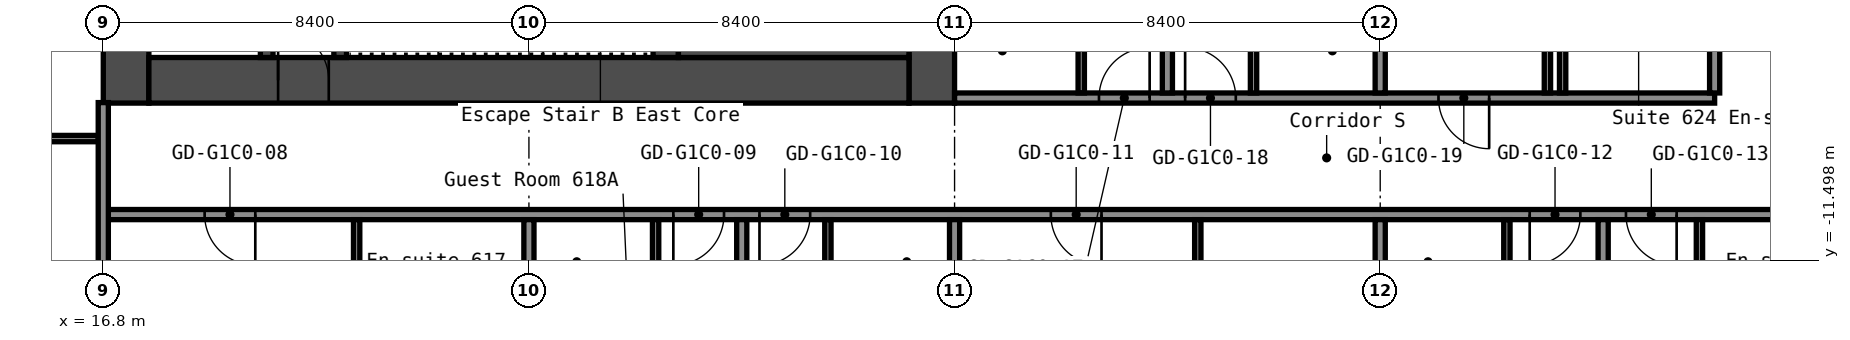
"""IFC4 building model, lengths in metres.
Left out: names, types, materials, properties, quantities, classifications, styles, units other than length and angle.
Written with IfcOpenShell. Run it as: python <this file> out.ifc"""

import sys

from ifc_helpers import new_model, si_unit, direction, frame, frame_2d, origin, place, context, subcontext, project, spatial, rectangle, extrude, element, fill, save


model = new_model("IFC4")
c1 = context("Model", 3, precision=1e-05, world=origin(), true_north=direction((0.0, 1.0)))
c2 = subcontext(c1, "Body", "Model", "MODEL_VIEW")
j1 = project(units=[si_unit("LENGTHUNIT", "METRE"), si_unit("PLANEANGLEUNIT", "RADIAN")], contexts=[c1])
p1 = place(None, origin())
s1 = spatial("IfcSite", under=j1, at=p1, CompositionType="ELEMENT")
p2 = place(p1, origin())
s2 = spatial("IfcBuilding", under=s1, at=p2, CompositionType="ELEMENT")
p3 = place(p2, frame((0.0, 0.0, 26.2)))
s3 = spatial("IfcBuildingStorey", under=s2, at=p3, CompositionType="ELEMENT", Elevation=26.2)
p4 = place(p3, frame((17.25, -8.4, 0.0), z_axis=(0.0, 0.0, 1.0), x_axis=(0.0, 1.0, 0.0)))
e1 = element("IfcWall", 1, at=p4, inside=s3, PredefinedType="SHEAR", context=c2, shape_type="SweptSolid", body=[
    extrude(rectangle(XDim=16.8, YDim=0.9, at=frame_2d((8.4, 0.0))), origin(), (0.0, 0.0, 1.0), 2.8),
])
p5 = place(p4, frame((12.75, 0.0, 0.0)))
e2 = element("IfcOpeningElement", 2, at=p5, cuts=e1, PredefinedType="OPENING", context=c2, shape_type="SweptSolid", body=[
    extrude(rectangle(XDim=1.2, YDim=2.1, at=frame_2d((0.6, 1.05))), frame((0.0, 0.46, 0.0), z_axis=(0.0, -1.0, 0.0), x_axis=(1.0, 0.0, 0.0)), (0.0, 0.0, 1.0), 0.92),
])
p6 = place(p4, frame((2.85, 0.0, 0.0)))
e3 = element("IfcOpeningElement", 3, at=p6, cuts=e1, PredefinedType="OPENING", context=c2, shape_type="SweptSolid", body=[
    extrude(rectangle(XDim=1.2, YDim=2.1, at=frame_2d((0.6, 1.05))), frame((0.0, 0.46, 0.0), z_axis=(0.0, -1.0, 0.0), x_axis=(1.0, 0.0, 0.0)), (0.0, 0.0, 1.0), 0.92),
])
p7 = place(p3, frame((33.15, -8.4, 0.0), z_axis=(0.0, 0.0, 1.0), x_axis=(0.0, 1.0, 0.0)))
e4 = element("IfcWall", 4, at=p7, inside=s3, PredefinedType="SHEAR", context=c2, shape_type="SweptSolid", body=[
    extrude(rectangle(XDim=16.8, YDim=0.9, at=frame_2d((8.4, 0.0))), origin(), (0.0, 0.0, 1.0), 2.8),
])
p8 = place(p3, frame((17.7, -7.95, 0.0), z_axis=(0.0, 0.0, 1.0), x_axis=(1.0, 0.0, 0.0)))
e5 = element("IfcWall", 5, at=p8, inside=s3, PredefinedType="SHEAR", context=c2, shape_type="SweptSolid", body=[
    extrude(rectangle(XDim=15.0, YDim=0.9, at=frame_2d((7.5, 0.0))), origin(), (0.0, 0.0, 1.0), 2.8),
])
p9 = place(p8, frame((2.55, 0.0, 0.0)))
e6 = element("IfcOpeningElement", 6, at=p9, cuts=e5, PredefinedType="OPENING", context=c2, shape_type="SweptSolid", body=[
    extrude(rectangle(XDim=1.0, YDim=2.1, at=frame_2d((0.5, 1.05))), frame((0.0, 0.46, 0.0), z_axis=(0.0, -1.0, 0.0), x_axis=(1.0, 0.0, 0.0)), (0.0, 0.0, 1.0), 0.92),
])
p10 = place(p3, frame((20.025, -7.5, 0.0), z_axis=(0.0, 0.0, 1.0), x_axis=(0.0, 1.0, 0.0)))
e7 = element("IfcWall", 7, at=p10, inside=s3, PredefinedType="SHEAR", context=c2, shape_type="SweptSolid", body=[
    extrude(rectangle(XDim=6.3, YDim=0.25, at=frame_2d((3.15, 0.0))), origin(), (0.0, 0.0, 1.0), 2.8),
])
p11 = place(p10, frame((2.4, 0.0, 0.0)))
e8 = element("IfcOpeningElement", 8, at=p11, cuts=e7, PredefinedType="OPENING", context=c2, shape_type="SweptSolid", body=[
    extrude(rectangle(XDim=1.0, YDim=2.1, at=frame_2d((0.5, 1.05))), frame((0.0, 0.135, 0.0), z_axis=(0.0, -1.0, 0.0), x_axis=(1.0, 0.0, 0.0)), (0.0, 0.0, 1.0), 0.27),
])
p12 = place(p3, frame((21.475, -7.5, 0.0), z_axis=(0.0, 0.0, 1.0), x_axis=(0.0, 1.0, 0.0)))
e9 = element("IfcWall", 9, at=p12, inside=s3, PredefinedType="SHEAR", context=c2, shape_type="SweptSolid", body=[
    extrude(rectangle(XDim=3.75, YDim=0.25, at=frame_2d((1.875, 0.0))), origin(), (0.0, 0.0, 1.0), 2.8),
])
p13 = place(p12, frame((1.3, 0.0, 0.0)))
e10 = element("IfcOpeningElement", 10, at=p13, cuts=e9, PredefinedType="OPENING", context=c2, shape_type="SweptSolid", body=[
    extrude(rectangle(XDim=1.2, YDim=2.1, at=frame_2d((0.6, 1.05))), frame((0.0, 0.135, 0.0), z_axis=(0.0, -1.0, 0.0), x_axis=(1.0, 0.0, 0.0)), (0.0, 0.0, 1.0), 0.27),
])
p14 = place(p3, frame((27.9, -7.5, 0.0), z_axis=(0.0, 0.0, 1.0), x_axis=(0.0, 1.0, 0.0)))
e11 = element("IfcWall", 11, at=p14, inside=s3, PredefinedType="SHEAR", context=c2, shape_type="SweptSolid", body=[
    extrude(rectangle(XDim=3.75, YDim=0.5, at=frame_2d((1.875, 0.0))), origin(), (0.0, 0.0, 1.0), 2.8),
])
p15 = place(p3, frame((28.15, -6.75, 0.0), z_axis=(0.0, 0.0, 1.0), x_axis=(1.0, 0.0, 0.0)))
e12 = element("IfcWall", 12, at=p15, inside=s3, PredefinedType="SHEAR", context=c2, shape_type="SweptSolid", body=[
    extrude(rectangle(XDim=4.55, YDim=1.5, at=frame_2d((2.275, 0.0))), origin(), (0.0, 0.0, 1.0), 2.8),
])
p16 = place(p3, frame((16.8, -10.6, 0.0), z_axis=(0.0, 0.0, 1.0), x_axis=(1.0, 0.0, 0.0)))
e13 = element("IfcWall", 13, at=p16, inside=s3, PredefinedType="PARTITIONING", context=c2, shape_type="SweptSolid", body=[
    extrude(rectangle(XDim=34.3, YDim=0.2, at=frame_2d((17.15, 0.0))), origin(), (0.0, 0.0, 1.0), 2.8),
])
p17 = place(p16, frame((2.0, 0.0, 0.0)))
e14 = element("IfcOpeningElement", 14, at=p17, cuts=e13, PredefinedType="OPENING", context=c2, shape_type="SweptSolid", body=[
    extrude(rectangle(XDim=1.0, YDim=2.1, at=frame_2d((0.5, 1.05))), frame((0.0, 0.11, 0.0), z_axis=(0.0, -1.0, 0.0), x_axis=(1.0, 0.0, 0.0)), (0.0, 0.0, 1.0), 0.22),
])
p18 = place(p16, frame((11.25, 0.0, 0.0)))
e15 = element("IfcOpeningElement", 15, at=p18, cuts=e13, PredefinedType="OPENING", context=c2, shape_type="SweptSolid", body=[
    extrude(rectangle(XDim=1.0, YDim=2.1, at=frame_2d((0.5, 1.05))), frame((0.0, 0.11, 0.0), z_axis=(0.0, -1.0, 0.0), x_axis=(1.0, 0.0, 0.0)), (0.0, 0.0, 1.0), 0.22),
])
p19 = place(p16, frame((12.95, 0.0, 0.0)))
e16 = element("IfcOpeningElement", 16, at=p19, cuts=e13, PredefinedType="OPENING", context=c2, shape_type="SweptSolid", body=[
    extrude(rectangle(XDim=1.0, YDim=2.1, at=frame_2d((0.5, 1.05))), frame((0.0, 0.11, 0.0), z_axis=(0.0, -1.0, 0.0), x_axis=(1.0, 0.0, 0.0)), (0.0, 0.0, 1.0), 0.22),
])
p20 = place(p16, frame((18.7, 0.0, 0.0)))
e17 = element("IfcOpeningElement", 17, at=p20, cuts=e13, PredefinedType="OPENING", context=c2, shape_type="SweptSolid", body=[
    extrude(rectangle(XDim=1.0, YDim=2.1, at=frame_2d((0.5, 1.05))), frame((0.0, 0.11, 0.0), z_axis=(0.0, -1.0, 0.0), x_axis=(1.0, 0.0, 0.0)), (0.0, 0.0, 1.0), 0.22),
])
p21 = place(p16, frame((28.15, 0.0, 0.0)))
e18 = element("IfcOpeningElement", 18, at=p21, cuts=e13, PredefinedType="OPENING", context=c2, shape_type="SweptSolid", body=[
    extrude(rectangle(XDim=1.0, YDim=2.1, at=frame_2d((0.5, 1.05))), frame((0.0, 0.11, 0.0), z_axis=(0.0, -1.0, 0.0), x_axis=(1.0, 0.0, 0.0)), (0.0, 0.0, 1.0), 0.22),
])
p22 = place(p16, frame((30.05, 0.0, 0.0)))
e19 = element("IfcOpeningElement", 19, at=p22, cuts=e13, PredefinedType="OPENING", context=c2, shape_type="SweptSolid", body=[
    extrude(rectangle(XDim=1.0, YDim=2.1, at=frame_2d((0.5, 1.05))), frame((0.0, 0.11, 0.0), z_axis=(0.0, -1.0, 0.0), x_axis=(1.0, 0.0, 0.0)), (0.0, 0.0, 1.0), 0.22),
])
p23 = place(p3, frame((14.363, -9.1, 0.0), z_axis=(0.0, 0.0, 1.0), x_axis=(1.0, 0.0, 0.0)))
e20 = element("IfcWall", 20, at=p23, inside=s3, PredefinedType="PARTITIONING", context=c2, shape_type="SweptSolid", body=[
    extrude(rectangle(XDim=2.337, YDim=0.125, at=frame_2d((1.169, 0.0))), origin(), (0.0, 0.0, 1.0), 2.8),
])
p24 = place(p3, frame((33.6, -8.3, 0.0), z_axis=(0.0, 0.0, 1.0), x_axis=(1.0, 0.0, 0.0)))
e21 = element("IfcWall", 21, at=p24, inside=s3, PredefinedType="PARTITIONING", context=c2, shape_type="SweptSolid", body=[
    extrude(rectangle(XDim=15.0, YDim=0.2, at=frame_2d((7.5, 0.0))), origin(), (0.0, 0.0, 1.0), 2.8),
])
p25 = place(p24, frame((2.85, 0.0, 0.0)))
e22 = element("IfcOpeningElement", 22, at=p25, cuts=e21, PredefinedType="OPENING", context=c2, shape_type="SweptSolid", body=[
    extrude(rectangle(XDim=1.0, YDim=2.1, at=frame_2d((0.5, 1.05))), frame((0.0, 0.11, 0.0), z_axis=(0.0, -1.0, 0.0), x_axis=(1.0, 0.0, 0.0)), (0.0, 0.0, 1.0), 0.22),
])
p26 = place(p24, frame((4.55, 0.0, 0.0)))
e23 = element("IfcOpeningElement", 23, at=p26, cuts=e21, PredefinedType="OPENING", context=c2, shape_type="SweptSolid", body=[
    extrude(rectangle(XDim=1.0, YDim=2.1, at=frame_2d((0.5, 1.05))), frame((0.0, 0.11, 0.0), z_axis=(0.0, -1.0, 0.0), x_axis=(1.0, 0.0, 0.0)), (0.0, 0.0, 1.0), 0.22),
])
p27 = place(p24, frame((9.55, 0.0, 0.0)))
e24 = element("IfcOpeningElement", 24, at=p27, cuts=e21, PredefinedType="OPENING", context=c2, shape_type="SweptSolid", body=[
    extrude(rectangle(XDim=1.0, YDim=2.1, at=frame_2d((0.5, 1.05))), frame((0.0, 0.11, 0.0), z_axis=(0.0, -1.0, 0.0), x_axis=(1.0, 0.0, 0.0)), (0.0, 0.0, 1.0), 0.22),
])
p28 = place(p3, frame((16.8, -20.3, 0.0), z_axis=(0.0, 0.0, 1.0), x_axis=(0.0, 1.0, 0.0)))
e25 = element("IfcWall", 25, at=p28, inside=s3, PredefinedType="PARTITIONING", context=c2, shape_type="SweptSolid", body=[
    extrude(rectangle(XDim=11.91, YDim=0.2, at=frame_2d((5.955, 0.0))), origin(), (0.0, 0.0, 1.0), 2.8),
])
p29 = place(p3, frame((21.8, -14.0, 0.0), z_axis=(0.0, 0.0, 1.0), x_axis=(0.0, 1.0, 0.0)))
e26 = element("IfcWall", 26, at=p29, inside=s3, PredefinedType="PARTITIONING", context=c2, shape_type="SweptSolid", body=[
    extrude(rectangle(XDim=3.3, YDim=0.125, at=frame_2d((1.65, 0.0))), origin(), (0.0, 0.0, 1.0), 2.8),
])
p30 = place(p3, frame((25.2, -20.3, 0.0), z_axis=(0.0, 0.0, 1.0), x_axis=(0.0, 1.0, 0.0)))
e27 = element("IfcWall", 27, at=p30, inside=s3, PredefinedType="PARTITIONING", context=c2, shape_type="SweptSolid", body=[
    extrude(rectangle(XDim=9.6, YDim=0.2, at=frame_2d((4.8, 0.0))), origin(), (0.0, 0.0, 1.0), 2.8),
])
p31 = place(p3, frame((27.7, -13.6, 0.0), z_axis=(0.0, 0.0, 1.0), x_axis=(0.0, 1.0, 0.0)))
e28 = element("IfcWall", 28, at=p31, inside=s3, PredefinedType="PARTITIONING", context=c2, shape_type="SweptSolid", body=[
    extrude(rectangle(XDim=2.9, YDim=0.125, at=frame_2d((1.45, 0.0))), origin(), (0.0, 0.0, 1.0), 2.8),
])
p32 = place(p31, frame((0.6, 0.0, 0.0)))
e29 = element("IfcOpeningElement", 29, at=p32, cuts=e28, PredefinedType="OPENING", context=c2, shape_type="SweptSolid", body=[
    extrude(rectangle(XDim=0.8, YDim=2.1, at=frame_2d((0.4, 1.05))), frame((0.0, 0.073, 0.0), z_axis=(0.0, -1.0, 0.0), x_axis=(1.0, 0.0, 0.0)), (0.0, 0.0, 1.0), 0.145),
])
p33 = place(p3, frame((29.4, -20.3, 0.0), z_axis=(0.0, 0.0, 1.0), x_axis=(0.0, 1.0, 0.0)))
e30 = element("IfcWall", 30, at=p33, inside=s3, PredefinedType="PARTITIONING", context=c2, shape_type="SweptSolid", body=[
    extrude(rectangle(XDim=9.6, YDim=0.2, at=frame_2d((4.8, 0.0))), origin(), (0.0, 0.0, 1.0), 2.8),
])
p34 = place(p3, frame((31.1, -13.6, 0.0), z_axis=(0.0, 0.0, 1.0), x_axis=(0.0, 1.0, 0.0)))
e31 = element("IfcWall", 31, at=p34, inside=s3, PredefinedType="PARTITIONING", context=c2, shape_type="SweptSolid", body=[
    extrude(rectangle(XDim=2.9, YDim=0.125, at=frame_2d((1.45, 0.0))), origin(), (0.0, 0.0, 1.0), 2.8),
])
p35 = place(p34, frame((0.6, 0.0, 0.0)))
e32 = element("IfcOpeningElement", 32, at=p35, cuts=e31, PredefinedType="OPENING", context=c2, shape_type="SweptSolid", body=[
    extrude(rectangle(XDim=0.8, YDim=2.1, at=frame_2d((0.4, 1.05))), frame((0.0, 0.073, 0.0), z_axis=(0.0, -1.0, 0.0), x_axis=(1.0, 0.0, 0.0)), (0.0, 0.0, 1.0), 0.145),
])
p36 = place(p3, frame((33.6, -20.3, 0.0), z_axis=(0.0, 0.0, 1.0), x_axis=(0.0, 1.0, 0.0)))
e33 = element("IfcWall", 33, at=p36, inside=s3, PredefinedType="PARTITIONING", context=c2, shape_type="SweptSolid", body=[
    extrude(rectangle(XDim=9.6, YDim=0.2, at=frame_2d((4.8, 0.0))), origin(), (0.0, 0.0, 1.0), 2.8),
])
p37 = place(p3, frame((36.1, -8.2, 0.0), z_axis=(0.0, 0.0, 1.0), x_axis=(0.0, 1.0, 0.0)))
e34 = element("IfcWall", 34, at=p37, inside=s3, PredefinedType="PARTITIONING", context=c2, shape_type="SweptSolid", body=[
    extrude(rectangle(XDim=2.9, YDim=0.125, at=frame_2d((1.45, 0.0))), origin(), (0.0, 0.0, 1.0), 2.8),
])
p38 = place(p37, frame((1.5, 0.0, 0.0)))
e35 = element("IfcOpeningElement", 35, at=p38, cuts=e34, PredefinedType="OPENING", context=c2, shape_type="SweptSolid", body=[
    extrude(rectangle(XDim=0.8, YDim=2.1, at=frame_2d((0.4, 1.05))), frame((0.0, 0.073, 0.0), z_axis=(0.0, -1.0, 0.0), x_axis=(1.0, 0.0, 0.0)), (0.0, 0.0, 1.0), 0.145),
])
p39 = place(p3, frame((37.8, -8.2, 0.0), z_axis=(0.0, 0.0, 1.0), x_axis=(0.0, 1.0, 0.0)))
e36 = element("IfcWall", 36, at=p39, inside=s3, PredefinedType="PARTITIONING", context=c2, shape_type="SweptSolid", body=[
    extrude(rectangle(XDim=8.2, YDim=0.2, at=frame_2d((4.1, 0.0))), origin(), (0.0, 0.0, 1.0), 2.8),
])
p40 = place(p3, frame((38.4, -14.0, 0.0), z_axis=(0.0, 0.0, 1.0), x_axis=(0.0, 1.0, 0.0)))
e37 = element("IfcWall", 37, at=p40, inside=s3, PredefinedType="PARTITIONING", context=c2, shape_type="SweptSolid", body=[
    extrude(rectangle(XDim=3.3, YDim=0.125, at=frame_2d((1.65, 0.0))), origin(), (0.0, 0.0, 1.0), 2.8),
])
p41 = place(p40, frame((1.2, 0.0, 0.0)))
e38 = element("IfcOpeningElement", 38, at=p41, cuts=e37, PredefinedType="OPENING", context=c2, shape_type="SweptSolid", body=[
    extrude(rectangle(XDim=1.0, YDim=2.1, at=frame_2d((0.5, 1.05))), frame((0.0, 0.073, 0.0), z_axis=(0.0, -1.0, 0.0), x_axis=(1.0, 0.0, 0.0)), (0.0, 0.0, 1.0), 0.145),
])
p42 = place(p3, frame((39.5, -8.2, 0.0), z_axis=(0.0, 0.0, 1.0), x_axis=(0.0, 1.0, 0.0)))
e39 = element("IfcWall", 39, at=p42, inside=s3, PredefinedType="PARTITIONING", context=c2, shape_type="SweptSolid", body=[
    extrude(rectangle(XDim=2.9, YDim=0.125, at=frame_2d((1.45, 0.0))), origin(), (0.0, 0.0, 1.0), 2.8),
])
p43 = place(p42, frame((1.5, 0.0, 0.0)))
e40 = element("IfcOpeningElement", 40, at=p43, cuts=e39, PredefinedType="OPENING", context=c2, shape_type="SweptSolid", body=[
    extrude(rectangle(XDim=0.8, YDim=2.1, at=frame_2d((0.4, 1.05))), frame((0.0, 0.073, 0.0), z_axis=(0.0, -1.0, 0.0), x_axis=(1.0, 0.0, 0.0)), (0.0, 0.0, 1.0), 0.145),
])
p44 = place(p3, frame((42.0, -20.3, 0.0), z_axis=(0.0, 0.0, 1.0), x_axis=(0.0, 1.0, 0.0)))
e41 = element("IfcWall", 41, at=p44, inside=s3, PredefinedType="PARTITIONING", context=c2, shape_type="SweptSolid", body=[
    extrude(rectangle(XDim=9.6, YDim=0.2, at=frame_2d((4.8, 0.0))), origin(), (0.0, 0.0, 1.0), 2.8),
])
p45 = place(p3, frame((42.0, -8.2, 0.0), z_axis=(0.0, 0.0, 1.0), x_axis=(0.0, 1.0, 0.0)))
e42 = element("IfcWall", 42, at=p45, inside=s3, PredefinedType="PARTITIONING", context=c2, shape_type="SweptSolid", body=[
    extrude(rectangle(XDim=16.4, YDim=0.2, at=frame_2d((8.2, 0.0))), origin(), (0.0, 0.0, 1.0), 2.8),
])
p46 = place(p3, frame((44.5, -13.6, 0.0), z_axis=(0.0, 0.0, 1.0), x_axis=(0.0, 1.0, 0.0)))
e43 = element("IfcWall", 43, at=p46, inside=s3, PredefinedType="PARTITIONING", context=c2, shape_type="SweptSolid", body=[
    extrude(rectangle(XDim=2.9, YDim=0.125, at=frame_2d((1.45, 0.0))), origin(), (0.0, 0.0, 1.0), 2.8),
])
p47 = place(p46, frame((0.6, 0.0, 0.0)))
e44 = element("IfcOpeningElement", 44, at=p47, cuts=e43, PredefinedType="OPENING", context=c2, shape_type="SweptSolid", body=[
    extrude(rectangle(XDim=0.8, YDim=2.1, at=frame_2d((0.4, 1.05))), frame((0.0, 0.073, 0.0), z_axis=(0.0, -1.0, 0.0), x_axis=(1.0, 0.0, 0.0)), (0.0, 0.0, 1.0), 0.145),
])
p48 = place(p3, frame((45.3, -8.2, 0.0), z_axis=(0.0, 0.0, 1.0), x_axis=(0.0, 1.0, 0.0)))
e45 = element("IfcWall", 45, at=p48, inside=s3, PredefinedType="PARTITIONING", context=c2, shape_type="SweptSolid", body=[
    extrude(rectangle(XDim=16.4, YDim=0.125, at=frame_2d((8.2, 0.0))), origin(), (0.0, 0.0, 1.0), 2.8),
])
p49 = place(p48, frame((4.05, 0.0, 0.0)))
e46 = element("IfcOpeningElement", 46, at=p49, cuts=e45, PredefinedType="OPENING", context=c2, shape_type="SweptSolid", body=[
    extrude(rectangle(XDim=0.9, YDim=2.1, at=frame_2d((0.45, 1.05))), frame((0.0, 0.073, 0.0), z_axis=(0.0, -1.0, 0.0), x_axis=(1.0, 0.0, 0.0)), (0.0, 0.0, 1.0), 0.145),
])
p50 = place(p48, frame((11.45, 0.0, 0.0)))
e47 = element("IfcOpeningElement", 47, at=p50, cuts=e45, PredefinedType="OPENING", context=c2, shape_type="SweptSolid", body=[
    extrude(rectangle(XDim=0.9, YDim=2.1, at=frame_2d((0.45, 1.05))), frame((0.0, 0.073, 0.0), z_axis=(0.0, -1.0, 0.0), x_axis=(1.0, 0.0, 0.0)), (0.0, 0.0, 1.0), 0.145),
])
p51 = place(p3, frame((45.6, -8.2, 0.0), z_axis=(0.0, 0.0, 1.0), x_axis=(0.0, 1.0, 0.0)))
e48 = element("IfcWall", 48, at=p51, inside=s3, PredefinedType="PARTITIONING", context=c2, shape_type="SweptSolid", body=[
    extrude(rectangle(XDim=3.1, YDim=0.125, at=frame_2d((1.55, 0.0))), origin(), (0.0, 0.0, 1.0), 2.8),
])
p52 = place(p3, frame((46.4, -20.3, 0.0), z_axis=(0.0, 0.0, 1.0), x_axis=(0.0, 1.0, 0.0)))
e49 = element("IfcWall", 49, at=p52, inside=s3, PredefinedType="PARTITIONING", context=c2, shape_type="SweptSolid", body=[
    extrude(rectangle(XDim=9.6, YDim=0.2, at=frame_2d((4.8, 0.0))), origin(), (0.0, 0.0, 1.0), 2.8),
])
p53 = place(p3, frame((48.3, -13.6, 0.0), z_axis=(0.0, 0.0, 1.0), x_axis=(0.0, 1.0, 0.0)))
e50 = element("IfcWall", 50, at=p53, inside=s3, PredefinedType="PARTITIONING", context=c2, shape_type="SweptSolid", body=[
    extrude(rectangle(XDim=2.9, YDim=0.125, at=frame_2d((1.45, 0.0))), origin(), (0.0, 0.0, 1.0), 2.8),
])
p54 = place(p53, frame((0.6, 0.0, 0.0)))
e51 = element("IfcOpeningElement", 51, at=p54, cuts=e50, PredefinedType="OPENING", context=c2, shape_type="SweptSolid", body=[
    extrude(rectangle(XDim=0.8, YDim=2.1, at=frame_2d((0.4, 1.05))), frame((0.0, 0.073, 0.0), z_axis=(0.0, -1.0, 0.0), x_axis=(1.0, 0.0, 0.0)), (0.0, 0.0, 1.0), 0.145),
])
p55 = place(p3, frame((48.6, -8.2, 0.0), z_axis=(0.0, 0.0, 1.0), x_axis=(0.0, 1.0, 0.0)))
e52 = element("IfcWall", 52, at=p55, inside=s3, PredefinedType="PARTITIONING", context=c2, shape_type="SweptSolid", body=[
    extrude(rectangle(XDim=16.4, YDim=0.2, at=frame_2d((8.2, 0.0))), origin(), (0.0, 0.0, 1.0), 2.8),
])
p56 = place(p9, origin())
e53 = element("IfcDoor", 53, at=p56, inside=s3, OperationType="SINGLE_SWING_RIGHT", PredefinedType="DOOR", context=c2, shape_type="SweptSolid", body=[
    extrude(rectangle(XDim=1.0, YDim=2.1, at=frame_2d((0.5, 1.05))), frame((0.0, 0.025, 0.0), z_axis=(0.0, -1.0, 0.0), x_axis=(1.0, 0.0, 0.0)), (0.0, 0.0, 1.0), 0.05),
])
fill(e6, e53)
p57 = place(p17, origin())
e54 = element("IfcDoor", 54, at=p57, inside=s3, OperationType="SINGLE_SWING_RIGHT", PredefinedType="DOOR", context=c2, shape_type="SweptSolid", body=[
    extrude(rectangle(XDim=1.0, YDim=2.1, at=frame_2d((0.5, 1.05))), frame((0.0, 0.025, 0.0), z_axis=(0.0, -1.0, 0.0), x_axis=(1.0, 0.0, 0.0)), (0.0, 0.0, 1.0), 0.05),
])
fill(e14, e54)
p58 = place(p18, origin())
e55 = element("IfcDoor", 55, at=p58, inside=s3, OperationType="SINGLE_SWING_LEFT", PredefinedType="DOOR", context=c2, shape_type="SweptSolid", body=[
    extrude(rectangle(XDim=1.0, YDim=2.1, at=frame_2d((0.5, 1.05))), frame((0.0, 0.025, 0.0), z_axis=(0.0, -1.0, 0.0), x_axis=(1.0, 0.0, 0.0)), (0.0, 0.0, 1.0), 0.05),
])
fill(e15, e55)
p59 = place(p19, origin())
e56 = element("IfcDoor", 56, at=p59, inside=s3, OperationType="SINGLE_SWING_LEFT", PredefinedType="DOOR", context=c2, shape_type="SweptSolid", body=[
    extrude(rectangle(XDim=1.0, YDim=2.1, at=frame_2d((0.5, 1.05))), frame((0.0, 0.025, 0.0), z_axis=(0.0, -1.0, 0.0), x_axis=(1.0, 0.0, 0.0)), (0.0, 0.0, 1.0), 0.05),
])
fill(e16, e56)
p60 = place(p20, origin())
e57 = element("IfcDoor", 57, at=p60, inside=s3, OperationType="SINGLE_SWING_RIGHT", PredefinedType="DOOR", context=c2, shape_type="SweptSolid", body=[
    extrude(rectangle(XDim=1.0, YDim=2.1, at=frame_2d((0.5, 1.05))), frame((0.0, 0.025, 0.0), z_axis=(0.0, -1.0, 0.0), x_axis=(1.0, 0.0, 0.0)), (0.0, 0.0, 1.0), 0.05),
])
fill(e17, e57)
p61 = place(p21, origin())
e58 = element("IfcDoor", 58, at=p61, inside=s3, OperationType="SINGLE_SWING_LEFT", PredefinedType="DOOR", context=c2, shape_type="SweptSolid", body=[
    extrude(rectangle(XDim=1.0, YDim=2.1, at=frame_2d((0.5, 1.05))), frame((0.0, 0.025, 0.0), z_axis=(0.0, -1.0, 0.0), x_axis=(1.0, 0.0, 0.0)), (0.0, 0.0, 1.0), 0.05),
])
fill(e18, e58)
p62 = place(p22, origin())
e59 = element("IfcDoor", 59, at=p62, inside=s3, OperationType="SINGLE_SWING_RIGHT", PredefinedType="DOOR", context=c2, shape_type="SweptSolid", body=[
    extrude(rectangle(XDim=1.0, YDim=2.1, at=frame_2d((0.5, 1.05))), frame((0.0, 0.025, 0.0), z_axis=(0.0, -1.0, 0.0), x_axis=(1.0, 0.0, 0.0)), (0.0, 0.0, 1.0), 0.05),
])
fill(e19, e59)
p63 = place(p25, origin())
e60 = element("IfcDoor", 60, at=p63, inside=s3, OperationType="SINGLE_SWING_LEFT", PredefinedType="DOOR", context=c2, shape_type="SweptSolid", body=[
    extrude(rectangle(XDim=1.0, YDim=2.1, at=frame_2d((0.5, 1.05))), frame((0.0, 0.025, 0.0), z_axis=(0.0, -1.0, 0.0), x_axis=(1.0, 0.0, 0.0)), (0.0, 0.0, 1.0), 0.05),
])
fill(e22, e60)
p64 = place(p26, origin())
e61 = element("IfcDoor", 61, at=p64, inside=s3, OperationType="SINGLE_SWING_RIGHT", PredefinedType="DOOR", context=c2, shape_type="SweptSolid", body=[
    extrude(rectangle(XDim=1.0, YDim=2.1, at=frame_2d((0.5, 1.05))), frame((0.0, 0.025, 0.0), z_axis=(0.0, -1.0, 0.0), x_axis=(1.0, 0.0, 0.0)), (0.0, 0.0, 1.0), 0.05),
])
fill(e23, e61)
p65 = place(p27, origin())
e62 = element("IfcDoor", 62, at=p65, inside=s3, OperationType="SINGLE_SWING_RIGHT", PredefinedType="DOOR", context=c2, shape_type="SweptSolid", body=[
    extrude(rectangle(XDim=1.0, YDim=2.1, at=frame_2d((0.5, 1.05))), frame((0.0, 0.025, 0.0), z_axis=(0.0, -1.0, 0.0), x_axis=(1.0, 0.0, 0.0)), (0.0, 0.0, 1.0), 0.05),
])
fill(e24, e62)
save(model, sys.argv[1])
